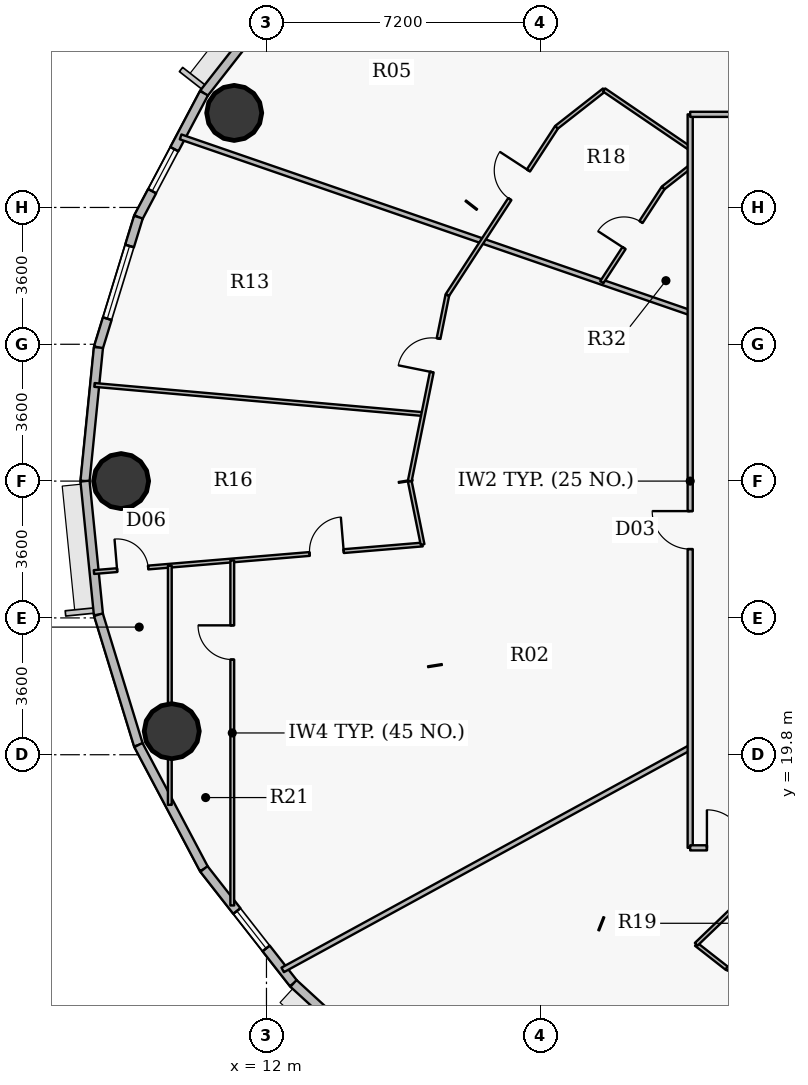
"""IFC4 building model, lengths in metres.
Left out: names, types, materials, properties, quantities, classifications, styles, units other than length and angle.
Written with IfcOpenShell. Run it as: python <this file> out.ifc"""

import sys

from ifc_helpers import new_model, si_unit, direction, frame, frame_2d, origin, origin_2d, place, context, subcontext, project, spatial, rectangle, hollow_circle, extrude, source, transform, mapped, element, fill, save


model = new_model("IFC4")
c1 = context("Model", 3, precision=1e-05, world=origin(), true_north=direction((0.0, 1.0)))
c2 = subcontext(c1, "Body", "Model", "MODEL_VIEW")
j1 = project(units=[si_unit("LENGTHUNIT", "METRE"), si_unit("PLANEANGLEUNIT", "RADIAN")], contexts=[c1])
p1 = place(None, origin())
s1 = spatial("IfcSite", under=j1, at=p1, CompositionType="ELEMENT")
p2 = place(p1, origin())
s2 = spatial("IfcBuilding", under=s1, at=p2, CompositionType="ELEMENT")
p3 = place(p2, frame((0.0, 0.0, 97.2)))
s3 = spatial("IfcBuildingStorey", under=s2, at=p3, CompositionType="ELEMENT", Elevation=97.2)
for number, where, z_axis, x_axis in (
    (1, (11.151, 36.688, 0.0), (0.0, 0.0, 1.0), (1.0, 0.0, 0.0)),
    (2, (8.175, 27.0, 0.0), (0.0, 0.0, 1.0), (1.0, 0.0, 0.0)),
    (3, (9.507, 20.419, 0.0), (0.0, 0.0, 1.0), (1.0, 0.0, 0.0)),
):
    element("IfcColumn", number, at=place(p3, frame(where, z_axis=z_axis, x_axis=x_axis)), inside=s3, PredefinedType="COLUMN", context=c2, shape_type="SweptSolid", body=[
        extrude(hollow_circle(Radius=0.725, WallThickness=0.042, at=origin_2d()), origin(), (0.0, 0.0, 1.0), 3.75),
    ])
p4 = place(p3, frame((10.355, 37.206, 0.0), z_axis=(0.0, 0.0, 1.0), x_axis=(0.616272103517, 0.787533297345, 0.0)))
e4 = element("IfcWall", 4, at=p4, inside=s3, PredefinedType="SOLIDWALL", context=c2, shape_type="SweptSolid", body=[
    extrude(rectangle(XDim=3.823, YDim=0.24, at=frame_2d((1.912, 0.0))), origin(), (0.0, 0.0, 1.0), 3.5),
])
p5 = place(p3, frame((8.63, 33.945, 0.0), z_axis=(0.0, 0.0, 1.0), x_axis=(0.467614004126, 0.883932770716, 0.0)))
e5 = element("IfcWall", 5, at=p5, inside=s3, PredefinedType="SOLIDWALL", context=c2, shape_type="SweptSolid", body=[
    extrude(rectangle(XDim=3.689, YDim=0.24, at=frame_2d((1.844, 0.0))), origin(), (0.0, 0.0, 1.0), 3.5),
])
p6 = place(p5, frame((0.774, 0.0, 0.9)))
e6 = element("IfcOpeningElement", 6, at=p6, cuts=e5, PredefinedType="OPENING", context=c2, shape_type="SweptSolid", body=[
    extrude(rectangle(XDim=1.25, YDim=1.65, at=origin_2d()), frame((0.625, 0.13, 0.825), z_axis=(0.0, -1.0, 0.0), x_axis=(1.0, 0.0, 0.0)), (0.0, 0.0, 1.0), 0.26),
])
p7 = place(p3, frame((7.578, 30.515, 0.0), z_axis=(0.0, 0.0, 1.0), x_axis=(0.293124431344, 0.956074300329, 0.0)))
e7 = element("IfcWall", 7, at=p7, inside=s3, PredefinedType="SOLIDWALL", context=c2, shape_type="SweptSolid", body=[
    extrude(rectangle(XDim=3.587, YDim=0.24, at=frame_2d((1.793, 0.0))), origin(), (0.0, 0.0, 1.0), 3.5),
])
p8 = place(p7, frame((0.794, 0.0, 0.9)))
e8 = element("IfcOpeningElement", 8, at=p8, cuts=e7, PredefinedType="OPENING", context=c2, shape_type="SweptSolid", body=[
    extrude(rectangle(XDim=2.0, YDim=1.75, at=origin_2d()), frame((1.0, 0.13, 0.875), z_axis=(0.0, -1.0, 0.0), x_axis=(1.0, 0.0, 0.0)), (0.0, 0.0, 1.0), 0.26),
])
for number, where, z_axis, x_axis in (
    (9, (7.225, 27.0, 0.0), (0.0, 0.0, 1.0), (0.1, 0.995, 0.0)),
    (10, (7.578, 23.485, 0.0), (0.0, 0.0, 1.0), (-0.1, 0.995, 0.0)),
):
    element("IfcWall", number, at=place(p3, frame(where, z_axis=z_axis, x_axis=x_axis)), inside=s3, PredefinedType="SOLIDWALL", context=c2, shape_type="SweptSolid", body=[
        extrude(rectangle(XDim=3.533, YDim=0.24, at=frame_2d((1.767, 0.0))), origin(), (0.0, 0.0, 1.0), 3.5),
    ])
p9 = place(p3, frame((8.63, 20.055, 0.0), z_axis=(0.0, 0.0, 1.0), x_axis=(-0.293124431344, 0.956074300329, 0.0)))
e11 = element("IfcWall", 11, at=p9, inside=s3, PredefinedType="SOLIDWALL", context=c2, shape_type="SweptSolid", body=[
    extrude(rectangle(XDim=3.587, YDim=0.24, at=frame_2d((1.793, 0.0))), origin(), (0.0, 0.0, 1.0), 3.5),
])
p10 = place(p3, frame((10.355, 16.794, 0.0), z_axis=(0.0, 0.0, 1.0), x_axis=(-0.467614004126, 0.883932770716, 0.0)))
e12 = element("IfcWall", 12, at=p10, inside=s3, PredefinedType="SOLIDWALL", context=c2, shape_type="SweptSolid", body=[
    extrude(rectangle(XDim=3.689, YDim=0.24, at=frame_2d((1.844, 0.0))), origin(), (0.0, 0.0, 1.0), 3.5),
])
p11 = place(p3, frame((12.711, 13.783, 0.0), z_axis=(0.0, 0.0, 1.0), x_axis=(-0.616272103517, 0.787533297345, 0.0)))
e13 = element("IfcWall", 13, at=p11, inside=s3, PredefinedType="SOLIDWALL", context=c2, shape_type="SweptSolid", body=[
    extrude(rectangle(XDim=3.823, YDim=0.24, at=frame_2d((1.912, 0.0))), origin(), (0.0, 0.0, 1.0), 3.5),
])
p12 = place(p11, frame((1.168, 0.0, 0.9)))
e14 = element("IfcOpeningElement", 14, at=p12, cuts=e13, PredefinedType="OPENING", context=c2, shape_type="SweptSolid", body=[
    extrude(rectangle(XDim=1.25, YDim=1.65, at=origin_2d()), frame((0.625, 0.13, 0.825), z_axis=(0.0, -1.0, 0.0), x_axis=(1.0, 0.0, 0.0)), (0.0, 0.0, 1.0), 0.26),
])
p13 = place(p3, frame((15.642, 11.097, 0.0), z_axis=(0.0, 0.0, 1.0), x_axis=(-0.737113356241, 0.675769117414, 0.0)))
e15 = element("IfcWall", 15, at=p13, inside=s3, PredefinedType="SOLIDWALL", context=c2, shape_type="SweptSolid", body=[
    extrude(rectangle(XDim=3.976, YDim=0.24, at=frame_2d((1.988, 0.0))), origin(), (0.0, 0.0, 1.0), 3.5),
])
p14 = place(p3, frame((7.461, 24.606, 0.0), z_axis=(0.0, 0.0, 1.0), x_axis=(0.996502351316, 0.083564728334, 0.0)))
e16 = element("IfcWall", 16, at=p14, inside=s3, PredefinedType="PARTITIONING", context=c2, shape_type="SweptSolid", body=[
    extrude(rectangle(XDim=8.677, YDim=0.1, at=frame_2d((4.338, 0.0))), origin(), (0.0, 0.0, 1.0), 2.935),
])
p15 = place(p14, frame((5.695, 0.0, 0.0)))
e17 = element("IfcOpeningElement", 17, at=p15, cuts=e16, PredefinedType="OPENING", context=c2, shape_type="SweptSolid", body=[
    extrude(rectangle(XDim=0.9, YDim=2.1, at=origin_2d()), frame((0.45, 0.06, 1.05), z_axis=(0.0, -1.0, 0.0), x_axis=(1.0, 0.0, 0.0)), (0.0, 0.0, 1.0), 0.12),
])
p16 = place(p14, frame((0.612, 0.0, 0.0)))
e18 = element("IfcOpeningElement", 18, at=p16, cuts=e16, PredefinedType="OPENING", context=c2, shape_type="SweptSolid", body=[
    extrude(rectangle(XDim=0.82, YDim=2.1, at=origin_2d()), frame((0.41, 0.06, 1.05), z_axis=(0.0, -1.0, 0.0), x_axis=(1.0, 0.0, 0.0)), (0.0, 0.0, 1.0), 0.12),
])
p17 = place(p3, frame((7.474, 29.53, 0.0), z_axis=(0.0, 0.0, 1.0), x_axis=(0.99609030315, -0.088340862406, 0.0)))
e19 = element("IfcWall", 19, at=p17, inside=s3, PredefinedType="PARTITIONING", context=c2, shape_type="SweptSolid", body=[
    extrude(rectangle(XDim=8.686, YDim=0.1, at=frame_2d((4.343, 0.0))), origin(), (0.0, 0.0, 1.0), 2.935),
])
p18 = place(p3, frame((9.457, 18.481, 0.0), z_axis=(0.0, 0.0, 1.0), x_axis=(0.0, 1.0, 0.0)))
e20 = element("IfcWall", 20, at=p18, inside=s3, PredefinedType="PARTITIONING", context=c2, shape_type="SweptSolid", body=[
    extrude(rectangle(XDim=6.293, YDim=0.1, at=frame_2d((3.146, 0.0))), origin(), (0.0, 0.0, 1.0), 2.935),
])
p19 = place(p3, frame((9.741, 36.057, 0.0), z_axis=(0.0, 0.0, 1.0), x_axis=(0.945349748634, -0.326058051207, 0.0)))
e21 = element("IfcWall", 21, at=p19, inside=s3, PredefinedType="PARTITIONING", context=c2, shape_type="SweptSolid", body=[
    extrude(rectangle(XDim=14.184, YDim=0.135, at=frame_2d((7.092, 0.0))), origin(), (0.0, 0.0, 1.0), 2.935),
])
p20 = place(p3, frame((11.1, 15.834, 0.0), z_axis=(0.0, 0.0, 1.0), x_axis=(0.0, 1.0, 0.0)))
e22 = element("IfcWall", 22, at=p20, inside=s3, PredefinedType="PARTITIONING", context=c2, shape_type="SweptSolid", body=[
    extrude(rectangle(XDim=9.078, YDim=0.1, at=frame_2d((4.539, 0.0))), origin(), (0.0, 0.0, 1.0), 2.935),
])
p21 = place(p20, frame((6.47, 0.0, 0.0)))
e23 = element("IfcOpeningElement", 23, at=p21, cuts=e22, PredefinedType="OPENING", context=c2, shape_type="SweptSolid", body=[
    extrude(rectangle(XDim=0.9, YDim=2.1, at=origin_2d()), frame((0.45, 0.06, 1.05), z_axis=(0.0, -1.0, 0.0), x_axis=(1.0, 0.0, 0.0)), (0.0, 0.0, 1.0), 0.12),
])
p22 = place(p3, frame((12.427, 14.138, 0.0), z_axis=(0.0, 0.0, 1.0), x_axis=(0.877835987922, 0.47896135367, 0.0)))
e24 = element("IfcWall", 24, at=p22, inside=s3, PredefinedType="PARTITIONING", context=c2, shape_type="SweptSolid", body=[
    extrude(rectangle(XDim=12.215, YDim=0.135, at=frame_2d((6.107, 0.0))), origin(), (0.0, 0.0, 1.0), 2.935),
])
p23 = place(p3, frame((15.77, 27.0, 0.0), z_axis=(0.0, 0.0, 1.0), x_axis=(0.198211883057, -0.980159195955, 0.0)))
e25 = element("IfcWall", 25, at=p23, inside=s3, PredefinedType="PARTITIONING", context=c2, shape_type="SweptSolid", body=[
    extrude(rectangle(XDim=1.702, YDim=0.1, at=frame_2d((0.851, 0.0))), origin(), (0.0, 0.0, 1.0), 2.935),
])
p24 = place(p3, frame((15.77, 27.0, 0.0), z_axis=(0.0, 0.0, 1.0), x_axis=(0.198230919145, 0.980155346205, 0.0)))
e26 = element("IfcWall", 26, at=p24, inside=s3, PredefinedType="PARTITIONING", context=c2, shape_type="SweptSolid", body=[
    extrude(rectangle(XDim=4.994, YDim=0.1, at=frame_2d((2.497, 0.0))), origin(), (0.0, 0.0, 1.0), 2.935),
])
p25 = place(p24, frame((2.926, 0.0, 0.0)))
e27 = element("IfcOpeningElement", 27, at=p25, cuts=e26, PredefinedType="OPENING", context=c2, shape_type="SweptSolid", body=[
    extrude(rectangle(XDim=0.9, YDim=2.1, at=origin_2d()), frame((0.45, 0.06, 1.05), z_axis=(0.0, -1.0, 0.0), x_axis=(1.0, 0.0, 0.0)), (0.0, 0.0, 1.0), 0.12),
])
p26 = place(p3, frame((16.76, 31.895, 0.0), z_axis=(0.0, 0.0, 1.0), x_axis=(0.545405249109, 0.838172484781, 0.0)))
e28 = element("IfcWall", 28, at=p26, inside=s3, PredefinedType="PARTITIONING", context=c2, shape_type="SweptSolid", body=[
    extrude(rectangle(XDim=5.269, YDim=0.1, at=frame_2d((2.634, 0.0))), origin(), (0.0, 0.0, 1.0), 2.935),
])
p27 = place(p26, frame((3.012, 0.0, 0.0)))
e29 = element("IfcOpeningElement", 29, at=p27, cuts=e28, PredefinedType="OPENING", context=c2, shape_type="SweptSolid", body=[
    extrude(rectangle(XDim=0.9, YDim=2.1, at=origin_2d()), frame((0.45, 0.06, 1.05), z_axis=(0.0, -1.0, 0.0), x_axis=(1.0, 0.0, 0.0)), (0.0, 0.0, 1.0), 0.12),
])
p28 = place(p3, frame((19.634, 36.311, 0.0), z_axis=(0.0, 0.0, 1.0), x_axis=(0.787313775385, 0.616552527437, 0.0)))
e30 = element("IfcWall", 30, at=p28, inside=s3, PredefinedType="PARTITIONING", context=c2, shape_type="SweptSolid", body=[
    extrude(rectangle(XDim=1.59, YDim=0.1, at=frame_2d((0.795, 0.0))), origin(), (0.0, 0.0, 1.0), 3.5),
])
p29 = place(p3, frame((20.04, 45.668, 0.0), z_axis=(0.0, 0.0, 1.0), x_axis=(0.649828321201, -0.760081017369, 0.0)))
e31 = element("IfcWall", 31, at=p29, inside=s3, PredefinedType="PARTITIONING", context=c2, shape_type="SweptSolid", body=[
    extrude(rectangle(XDim=11.865, YDim=0.135, at=frame_2d((5.932, 0.0))), origin(), (0.0, 0.0, 1.0), 2.935),
])
p30 = place(p3, frame((20.825, 32.234, 0.0), z_axis=(0.0, 0.0, 1.0), x_axis=(0.545376787896, 0.838191004023, 0.0)))
e32 = element("IfcWall", 32, at=p30, inside=s3, PredefinedType="PARTITIONING", context=c2, shape_type="SweptSolid", body=[
    extrude(rectangle(XDim=2.96, YDim=0.1, at=frame_2d((1.48, 0.0))), origin(), (0.0, 0.0, 1.0), 2.935),
])
p31 = place(p30, frame((1.07, 0.0, 0.0)))
e33 = element("IfcOpeningElement", 33, at=p31, cuts=e32, PredefinedType="OPENING", context=c2, shape_type="SweptSolid", body=[
    extrude(rectangle(XDim=0.82, YDim=2.1, at=origin_2d()), frame((0.41, 0.06, 1.05), z_axis=(0.0, -1.0, 0.0), x_axis=(1.0, 0.0, 0.0)), (0.0, 0.0, 1.0), 0.12),
])
p32 = place(p3, frame((20.885, 37.291, 0.0), z_axis=(0.0, 0.0, 1.0), x_axis=(0.826581607155, -0.562816885596, 0.0)))
e34 = element("IfcWall", 34, at=p32, inside=s3, PredefinedType="PARTITIONING", context=c2, shape_type="SweptSolid", body=[
    extrude(rectangle(XDim=2.74, YDim=0.1, at=frame_2d((1.37, 0.0))), origin(), (0.0, 0.0, 1.0), 3.5),
])
p33 = place(p3, frame((22.439, 34.715, 0.0), z_axis=(0.0, 0.0, 1.0), x_axis=(0.787265250498, 0.616614486821, 0.0)))
e35 = element("IfcWall", 35, at=p33, inside=s3, PredefinedType="PARTITIONING", context=c2, shape_type="SweptSolid", body=[
    extrude(rectangle(XDim=0.903, YDim=0.1, at=frame_2d((0.451, 0.0))), origin(), (0.0, 0.0, 1.0), 3.5),
])
p34 = place(p3, frame((23.15, 17.35, 0.0), z_axis=(0.0, 0.0, 1.0), x_axis=(0.0, 1.0, 0.0)))
e36 = element("IfcWall", 36, at=p34, inside=s3, PredefinedType="PARTITIONING", context=c2, shape_type="SweptSolid", body=[
    extrude(rectangle(XDim=19.3, YDim=0.135, at=frame_2d((9.65, 0.0))), origin(), (0.0, 0.0, 1.0), 2.935),
])
p35 = place(p34, frame((7.86, 0.0, 0.0)))
e37 = element("IfcOpeningElement", 37, at=p35, cuts=e36, PredefinedType="OPENING", context=c2, shape_type="SweptSolid", body=[
    extrude(rectangle(XDim=1.0, YDim=2.15, at=origin_2d()), frame((0.5, 0.078, 1.075), z_axis=(0.0, -1.0, 0.0), x_axis=(1.0, 0.0, 0.0)), (0.0, 0.0, 1.0), 0.155),
])
p36 = place(p3, frame((23.15, 17.35, 0.0), z_axis=(0.0, 0.0, 1.0), x_axis=(1.0, 0.0, 0.0)))
e38 = element("IfcWall", 38, at=p36, inside=s3, PredefinedType="PARTITIONING", context=c2, shape_type="SweptSolid", body=[
    extrude(rectangle(XDim=10.373, YDim=0.135, at=frame_2d((5.187, 0.0))), origin(), (0.0, 0.0, 1.0), 2.935),
])
p37 = place(p36, frame((0.44, 0.0, 0.0)))
e39 = element("IfcOpeningElement", 39, at=p37, cuts=e38, PredefinedType="OPENING", context=c2, shape_type="SweptSolid", body=[
    extrude(rectangle(XDim=1.0, YDim=2.15, at=origin_2d()), frame((0.5, 0.078, 1.075), z_axis=(0.0, -1.0, 0.0), x_axis=(1.0, 0.0, 0.0)), (0.0, 0.0, 1.0), 0.155),
])
p38 = place(p3, frame((23.15, 36.65, 0.0), z_axis=(0.0, 0.0, 1.0), x_axis=(1.0, 0.0, 0.0)))
e40 = element("IfcWall", 40, at=p38, inside=s3, PredefinedType="PARTITIONING", context=c2, shape_type="SweptSolid", body=[
    extrude(rectangle(XDim=10.373, YDim=0.135, at=frame_2d((5.187, 0.0))), origin(), (0.0, 0.0, 1.0), 2.935),
])
p39 = place(p38, frame((6.966, 0.0, 0.0)))
e41 = element("IfcOpeningElement", 41, at=p39, cuts=e40, PredefinedType="OPENING", context=c2, shape_type="SweptSolid", body=[
    extrude(rectangle(XDim=1.0, YDim=2.15, at=origin_2d()), frame((0.5, 0.078, 1.075), z_axis=(0.0, -1.0, 0.0), x_axis=(1.0, 0.0, 0.0)), (0.0, 0.0, 1.0), 0.155),
])
p40 = place(p38, frame((1.82, 0.0, 0.0)))
e42 = element("IfcOpeningElement", 42, at=p40, cuts=e40, PredefinedType="OPENING", context=c2, shape_type="SweptSolid", body=[
    extrude(rectangle(XDim=1.0, YDim=2.15, at=origin_2d()), frame((0.5, 0.078, 1.075), z_axis=(0.0, -1.0, 0.0), x_axis=(1.0, 0.0, 0.0)), (0.0, 0.0, 1.0), 0.155),
])
p41 = place(p3, frame((23.307, 14.812, 0.0), z_axis=(0.0, 0.0, 1.0), x_axis=(0.787398737985, -0.616444018075, 0.0)))
e43 = element("IfcWall", 43, at=p41, inside=s3, PredefinedType="PARTITIONING", context=c2, shape_type="SweptSolid", body=[
    extrude(rectangle(XDim=1.018, YDim=0.1, at=frame_2d((0.509, 0.0))), origin(), (0.0, 0.0, 1.0), 3.185),
])
p42 = place(p3, frame((23.307, 14.812, 0.0), z_axis=(0.0, 0.0, 1.0), x_axis=(0.721286127108, 0.692637223113, 0.0)))
e44 = element("IfcWall", 44, at=p42, inside=s3, PredefinedType="PARTITIONING", context=c2, shape_type="SweptSolid", body=[
    extrude(rectangle(XDim=3.664, YDim=0.1, at=frame_2d((1.832, 0.0))), origin(), (0.0, 0.0, 1.0), 3.5),
])
p43 = place(p3, frame((23.808, 6.661, 0.0), z_axis=(0.0, 0.0, 1.0), x_axis=(0.51416439954, 0.857691652195, 0.0)))
e45 = element("IfcWall", 45, at=p43, inside=s3, PredefinedType="PARTITIONING", context=c2, shape_type="SweptSolid", body=[
    extrude(rectangle(XDim=12.462, YDim=0.135, at=frame_2d((6.231, 0.0))), origin(), (0.0, 0.0, 1.0), 2.935),
])
p44 = place(p3, frame((24.109, 14.184, 0.0), z_axis=(0.0, 0.0, 1.0), x_axis=(0.9288090756, -0.370558633798, 0.0)))
e46 = element("IfcWall", 46, at=p44, inside=s3, PredefinedType="PARTITIONING", context=c2, shape_type="SweptSolid", body=[
    extrude(rectangle(XDim=6.072, YDim=0.1, at=frame_2d((3.036, 0.0))), origin(), (0.0, 0.0, 1.0), 2.935),
])
p45 = place(p44, frame((1.398, 0.0, 0.0)))
e47 = element("IfcOpeningElement", 47, at=p45, cuts=e46, PredefinedType="OPENING", context=c2, shape_type="SweptSolid", body=[
    extrude(rectangle(XDim=0.9, YDim=2.1, at=origin_2d()), frame((0.45, 0.06, 1.05), z_axis=(0.0, -1.0, 0.0), x_axis=(1.0, 0.0, 0.0)), (0.0, 0.0, 1.0), 0.12),
])
m1 = source(origin(), c2, "Body", "SweptSolid", [
    extrude(rectangle(XDim=1.25, YDim=1.65, at=origin_2d()), frame((0.625, 0.03, 0.825), z_axis=(0.0, -1.0, 0.0), x_axis=(1.0, 0.0, 0.0)), (0.0, 0.0, 1.0), 0.06),
])
p46 = place(p6, origin())
e48 = element("IfcWindow", 48, at=p46, inside=s3, PartitioningType="SINGLE_PANEL", PredefinedType="WINDOW", context=c2, shape_type="MappedRepresentation", body=[
    mapped(m1, transform((0.0, 0.0, 0.0), x_axis=(1.0, 0.0, 0.0), y_axis=(0.0, 1.0, 0.0), z_axis=(0.0, 0.0, 1.0), scale=1.0)),
])
fill(e6, e48)
m2 = source(origin(), c2, "Body", "SweptSolid", [
    extrude(rectangle(XDim=2.0, YDim=1.75, at=origin_2d()), frame((1.0, 0.03, 0.875), z_axis=(0.0, -1.0, 0.0), x_axis=(1.0, 0.0, 0.0)), (0.0, 0.0, 1.0), 0.06),
])
p47 = place(p8, origin())
e49 = element("IfcWindow", 49, at=p47, inside=s3, PartitioningType="DOUBLE_PANEL_VERTICAL", PredefinedType="WINDOW", context=c2, shape_type="MappedRepresentation", body=[
    mapped(m2, transform((0.0, 0.0, 0.0), x_axis=(1.0, 0.0, 0.0), y_axis=(0.0, 1.0, 0.0), z_axis=(0.0, 0.0, 1.0), scale=1.0)),
])
fill(e8, e49)
p48 = place(p12, origin())
e50 = element("IfcWindow", 50, at=p48, inside=s3, PartitioningType="SINGLE_PANEL", PredefinedType="WINDOW", context=c2, shape_type="MappedRepresentation", body=[
    mapped(m1, transform((0.0, 0.0, 0.0), x_axis=(1.0, 0.0, 0.0), y_axis=(0.0, 1.0, 0.0), z_axis=(0.0, 0.0, 1.0), scale=1.0)),
])
fill(e14, e50)
m3 = source(origin(), c2, "Body", "SweptSolid", [
    extrude(rectangle(XDim=0.9, YDim=2.1, at=origin_2d()), frame((0.45, 0.025, 1.05), z_axis=(0.0, -1.0, 0.0), x_axis=(1.0, 0.0, 0.0)), (0.0, 0.0, 1.0), 0.05),
])
p49 = place(p27, origin())
e51 = element("IfcDoor", 51, at=p49, inside=s3, OperationType="SINGLE_SWING_RIGHT", PredefinedType="DOOR", context=c2, shape_type="MappedRepresentation", body=[
    mapped(m3, transform((0.0, 0.0, 0.0), x_axis=(1.0, 0.0, 0.0), y_axis=(0.0, 1.0, 0.0), z_axis=(0.0, 0.0, 1.0), scale=1.0)),
])
fill(e29, e51)
m4 = source(origin(), c2, "Body", "SweptSolid", [
    extrude(rectangle(XDim=0.82, YDim=2.1, at=origin_2d()), frame((0.41, 0.025, 1.05), z_axis=(0.0, -1.0, 0.0), x_axis=(1.0, 0.0, 0.0)), (0.0, 0.0, 1.0), 0.05),
])
p50 = place(p31, origin())
e52 = element("IfcDoor", 52, at=p50, inside=s3, OperationType="SINGLE_SWING_LEFT", PredefinedType="DOOR", context=c2, shape_type="MappedRepresentation", body=[
    mapped(m4, transform((0.0, 0.0, 0.0), x_axis=(1.0, 0.0, 0.0), y_axis=(0.0, 1.0, 0.0), z_axis=(0.0, 0.0, 1.0), scale=1.0)),
])
fill(e33, e52)
m5 = source(origin(), c2, "Body", "SweptSolid", [
    extrude(rectangle(XDim=1.0, YDim=2.15, at=origin_2d()), frame((0.5, 0.025, 1.075), z_axis=(0.0, -1.0, 0.0), x_axis=(1.0, 0.0, 0.0)), (0.0, 0.0, 1.0), 0.05),
])
p51 = place(p35, origin())
e53 = element("IfcDoor", 53, at=p51, inside=s3, OperationType="SINGLE_SWING_RIGHT", PredefinedType="DOOR", context=c2, shape_type="MappedRepresentation", body=[
    mapped(m5, transform((0.0, 0.0, 0.0), x_axis=(1.0, 0.0, 0.0), y_axis=(0.0, 1.0, 0.0), z_axis=(0.0, 0.0, 1.0), scale=1.0)),
])
fill(e37, e53)
p52 = place(p25, origin())
e54 = element("IfcDoor", 54, at=p52, inside=s3, OperationType="SINGLE_SWING_LEFT", PredefinedType="DOOR", context=c2, shape_type="MappedRepresentation", body=[
    mapped(m3, transform((0.0, 0.0, 0.0), x_axis=(1.0, 0.0, 0.0), y_axis=(0.0, 1.0, 0.0), z_axis=(0.0, 0.0, 1.0), scale=1.0)),
])
fill(e27, e54)
p53 = place(p15, origin())
e55 = element("IfcDoor", 55, at=p53, inside=s3, OperationType="SINGLE_SWING_RIGHT", PredefinedType="DOOR", context=c2, shape_type="MappedRepresentation", body=[
    mapped(m3, transform((0.0, 0.0, 0.0), x_axis=(1.0, 0.0, 0.0), y_axis=(0.0, 1.0, 0.0), z_axis=(0.0, 0.0, 1.0), scale=1.0)),
])
fill(e17, e55)
p54 = place(p16, origin())
e56 = element("IfcDoor", 56, at=p54, inside=s3, OperationType="SINGLE_SWING_LEFT", PredefinedType="DOOR", context=c2, shape_type="MappedRepresentation", body=[
    mapped(m4, transform((0.0, 0.0, 0.0), x_axis=(1.0, 0.0, 0.0), y_axis=(0.0, 1.0, 0.0), z_axis=(0.0, 0.0, 1.0), scale=1.0)),
])
fill(e18, e56)
p55 = place(p21, origin())
e57 = element("IfcDoor", 57, at=p55, inside=s3, OperationType="SINGLE_SWING_RIGHT", PredefinedType="DOOR", context=c2, shape_type="MappedRepresentation", body=[
    mapped(m3, transform((0.0, 0.0, 0.0), x_axis=(1.0, 0.0, 0.0), y_axis=(0.0, 1.0, 0.0), z_axis=(0.0, 0.0, 1.0), scale=1.0)),
])
fill(e23, e57)
p56 = place(p37, origin())
e58 = element("IfcDoor", 58, at=p56, inside=s3, OperationType="SINGLE_SWING_LEFT", PredefinedType="DOOR", context=c2, shape_type="MappedRepresentation", body=[
    mapped(m5, transform((0.0, 0.0, 0.0), x_axis=(1.0, 0.0, 0.0), y_axis=(0.0, 1.0, 0.0), z_axis=(0.0, 0.0, 1.0), scale=1.0)),
])
fill(e39, e58)
save(model, sys.argv[1])
